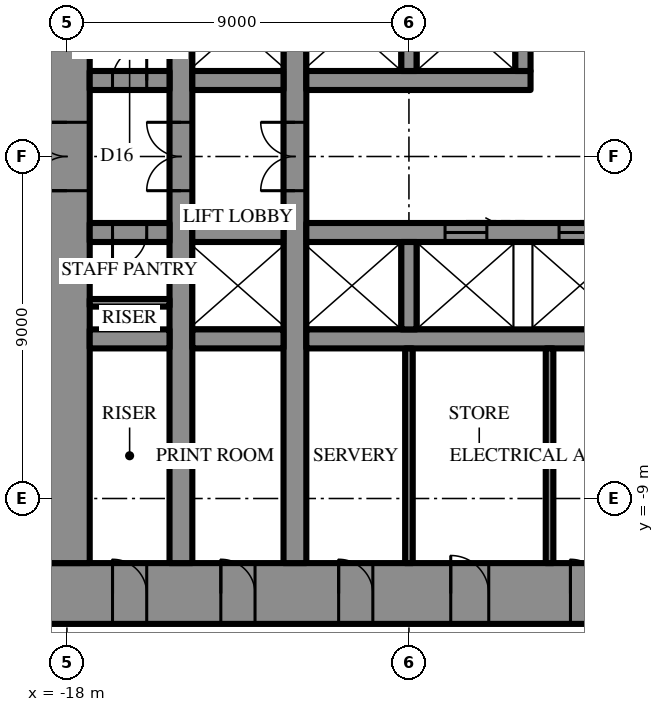
"""IFC4 building model, lengths in metres.
Left out: names, types, materials, properties, quantities, classifications, styles, units other than length and angle.
Written with IfcOpenShell. Run it as: python <this file> out.ifc"""

import sys

from ifc_helpers import new_model, si_unit, direction, frame, frame_2d, origin, place, context, subcontext, project, spatial, rectangle, extrude, element, fill, save


model = new_model("IFC4")
c1 = context("Model", 3, precision=1e-05, world=origin(), true_north=direction((0.0, 1.0)))
c2 = subcontext(c1, "Body", "Model", "MODEL_VIEW")
j1 = project(units=[si_unit("LENGTHUNIT", "METRE"), si_unit("PLANEANGLEUNIT", "RADIAN")], contexts=[c1])
p1 = place(None, origin())
s1 = spatial("IfcSite", under=j1, at=p1, CompositionType="ELEMENT")
p2 = place(p1, origin())
s2 = spatial("IfcBuilding", under=s1, at=p2, CompositionType="ELEMENT")
p3 = place(p2, frame((0.0, 0.0, 136.3)))
s3 = spatial("IfcBuildingStorey", under=s2, at=p3, CompositionType="ELEMENT", Elevation=136.3)
p4 = place(p3, frame((18.6, -11.5, 0.0), z_axis=(0.0, 0.0, 1.0), x_axis=(-1.0, 0.0, 0.0)))
e1 = element("IfcWall", 1, at=p4, inside=s3, PredefinedType="SHEAR", context=c2, shape_type="SweptSolid", body=[
    extrude(rectangle(XDim=37.2, YDim=1.6, at=frame_2d((18.6, 0.0))), origin(), (0.0, 0.0, 1.0), 4.2),
])
p5 = place(p4, frame((19.45, 0.0, 0.0)))
e2 = element("IfcOpeningElement", 2, at=p5, cuts=e1, PredefinedType="OPENING", context=c2, shape_type="SweptSolid", body=[
    extrude(rectangle(XDim=0.9, YDim=2.2, at=frame_2d((0.45, 1.1))), frame((0.0, 0.81, 0.0), z_axis=(0.0, -1.0, 0.0), x_axis=(1.0, 0.0, 0.0)), (0.0, 0.0, 1.0), 1.62),
])
p6 = place(p4, frame((22.45, 0.0, 0.0)))
e3 = element("IfcOpeningElement", 3, at=p6, cuts=e1, PredefinedType="OPENING", context=c2, shape_type="SweptSolid", body=[
    extrude(rectangle(XDim=0.9, YDim=2.2, at=frame_2d((0.45, 1.1))), frame((0.0, 0.81, 0.0), z_axis=(0.0, -1.0, 0.0), x_axis=(1.0, 0.0, 0.0)), (0.0, 0.0, 1.0), 1.62),
])
p7 = place(p4, frame((25.5, 0.0, 0.0)))
e4 = element("IfcOpeningElement", 4, at=p7, cuts=e1, PredefinedType="OPENING", context=c2, shape_type="SweptSolid", body=[
    extrude(rectangle(XDim=1.0, YDim=2.2, at=frame_2d((0.5, 1.1))), frame((0.0, 0.81, 0.0), z_axis=(0.0, -1.0, 0.0), x_axis=(1.0, 0.0, 0.0)), (0.0, 0.0, 1.0), 1.62),
])
p8 = place(p4, frame((1.8, 0.0, 0.0)))
e5 = element("IfcOpeningElement", 5, at=p8, cuts=e1, PredefinedType="OPENING", context=c2, shape_type="SweptSolid", body=[
    extrude(rectangle(XDim=0.9, YDim=2.2, at=frame_2d((0.45, 1.1))), frame((0.0, 0.81, 0.0), z_axis=(0.0, -1.0, 0.0), x_axis=(1.0, 0.0, 0.0)), (0.0, 0.0, 1.0), 1.62),
])
p9 = place(p4, frame((4.65, 0.0, 0.0)))
e6 = element("IfcOpeningElement", 6, at=p9, cuts=e1, PredefinedType="OPENING", context=c2, shape_type="SweptSolid", body=[
    extrude(rectangle(XDim=0.9, YDim=2.2, at=frame_2d((0.45, 1.1))), frame((0.0, 0.81, 0.0), z_axis=(0.0, -1.0, 0.0), x_axis=(1.0, 0.0, 0.0)), (0.0, 0.0, 1.0), 1.62),
])
p10 = place(p4, frame((7.75, 0.0, 0.0)))
e7 = element("IfcOpeningElement", 7, at=p10, cuts=e1, PredefinedType="OPENING", context=c2, shape_type="SweptSolid", body=[
    extrude(rectangle(XDim=0.9, YDim=2.2, at=frame_2d((0.45, 1.1))), frame((0.0, 0.81, 0.0), z_axis=(0.0, -1.0, 0.0), x_axis=(1.0, 0.0, 0.0)), (0.0, 0.0, 1.0), 1.62),
])
p11 = place(p4, frame((28.55, 0.0, 0.0)))
e8 = element("IfcOpeningElement", 8, at=p11, cuts=e1, PredefinedType="OPENING", context=c2, shape_type="SweptSolid", body=[
    extrude(rectangle(XDim=0.9, YDim=2.2, at=frame_2d((0.45, 1.1))), frame((0.0, 0.81, 0.0), z_axis=(0.0, -1.0, 0.0), x_axis=(1.0, 0.0, 0.0)), (0.0, 0.0, 1.0), 1.62),
])
p12 = place(p4, frame((31.65, 0.0, 0.0)))
e9 = element("IfcOpeningElement", 9, at=p12, cuts=e1, PredefinedType="OPENING", context=c2, shape_type="SweptSolid", body=[
    extrude(rectangle(XDim=0.9, YDim=2.2, at=frame_2d((0.45, 1.1))), frame((0.0, 0.81, 0.0), z_axis=(0.0, -1.0, 0.0), x_axis=(1.0, 0.0, 0.0)), (0.0, 0.0, 1.0), 1.62),
])
p13 = place(p4, frame((34.5, 0.0, 0.0)))
e10 = element("IfcOpeningElement", 10, at=p13, cuts=e1, PredefinedType="OPENING", context=c2, shape_type="SweptSolid", body=[
    extrude(rectangle(XDim=0.9, YDim=2.2, at=frame_2d((0.45, 1.1))), frame((0.0, 0.81, 0.0), z_axis=(0.0, -1.0, 0.0), x_axis=(1.0, 0.0, 0.0)), (0.0, 0.0, 1.0), 1.62),
])
p14 = place(p3, frame((-18.0, 10.7, 0.0), z_axis=(0.0, 0.0, 1.0), x_axis=(0.0, -1.0, 0.0)))
e11 = element("IfcWall", 11, at=p14, inside=s3, PredefinedType="SHEAR", context=c2, shape_type="SweptSolid", body=[
    extrude(rectangle(XDim=21.4, YDim=1.2, at=frame_2d((10.7, 0.0))), origin(), (0.0, 0.0, 1.0), 4.2),
])
p15 = place(p14, frame((9.8, 0.0, 0.0)))
e12 = element("IfcOpeningElement", 12, at=p15, cuts=e11, PredefinedType="OPENING", context=c2, shape_type="SweptSolid", body=[
    extrude(rectangle(XDim=1.8, YDim=2.4, at=frame_2d((0.9, 1.2))), frame((0.0, 0.61, 0.0), z_axis=(0.0, -1.0, 0.0), x_axis=(1.0, 0.0, 0.0)), (0.0, 0.0, 1.0), 1.22),
])
p16 = place(p3, frame((-12.0, -10.7, 0.0), z_axis=(0.0, 0.0, 1.0), x_axis=(0.0, 1.0, 0.0)))
e13 = element("IfcWall", 13, at=p16, inside=s3, PredefinedType="SHEAR", context=c2, shape_type="SweptSolid", body=[
    extrude(rectangle(XDim=21.4, YDim=0.6, at=frame_2d((10.7, 0.0))), origin(), (0.0, 0.0, 1.0), 4.2),
])
p17 = place(p16, frame((9.8, 0.0, 0.0)))
e14 = element("IfcOpeningElement", 14, at=p17, cuts=e13, PredefinedType="OPENING", context=c2, shape_type="SweptSolid", body=[
    extrude(rectangle(XDim=1.8, YDim=2.4, at=frame_2d((0.9, 1.2))), frame((0.0, 0.31, 0.0), z_axis=(0.0, -1.0, 0.0), x_axis=(1.0, 0.0, 0.0)), (0.0, 0.0, 1.0), 0.62),
])
p18 = place(p3, frame((-15.0, -10.7, 0.0), z_axis=(0.0, 0.0, 1.0), x_axis=(0.0, 1.0, 0.0)))
e15 = element("IfcWall", 15, at=p18, inside=s3, PredefinedType="SHEAR", context=c2, shape_type="SweptSolid", body=[
    extrude(rectangle(XDim=21.4, YDim=0.6, at=frame_2d((10.7, 0.0))), origin(), (0.0, 0.0, 1.0), 4.2),
])
p19 = place(p18, frame((9.8, 0.0, 0.0)))
e16 = element("IfcOpeningElement", 16, at=p19, cuts=e15, PredefinedType="OPENING", context=c2, shape_type="SweptSolid", body=[
    extrude(rectangle(XDim=1.8, YDim=2.4, at=frame_2d((0.9, 1.2))), frame((0.0, 0.31, 0.0), z_axis=(0.0, -1.0, 0.0), x_axis=(1.0, 0.0, 0.0)), (0.0, 0.0, 1.0), 0.62),
])
p20 = place(p3, frame((-17.4, 2.0, 0.0), z_axis=(0.0, 0.0, 1.0), x_axis=(1.0, 0.0, 0.0)))
e17 = element("IfcWall", 17, at=p20, inside=s3, PredefinedType="SHEAR", context=c2, shape_type="SweptSolid", body=[
    extrude(rectangle(XDim=2.1, YDim=0.5, at=frame_2d((1.05, 0.0))), origin(), (0.0, 0.0, 1.0), 4.2),
])
p21 = place(p20, frame((0.6, 0.0, 0.0)))
e18 = element("IfcOpeningElement", 18, at=p21, cuts=e17, PredefinedType="OPENING", context=c2, shape_type="SweptSolid", body=[
    extrude(rectangle(XDim=0.9, YDim=2.2, at=frame_2d((0.45, 1.1))), frame((0.0, 0.26, 0.0), z_axis=(0.0, -1.0, 0.0), x_axis=(1.0, 0.0, 0.0)), (0.0, 0.0, 1.0), 0.52),
])
p22 = place(p3, frame((-14.7, 2.0, 0.0), z_axis=(0.0, 0.0, 1.0), x_axis=(1.0, 0.0, 0.0)))
e19 = element("IfcWall", 19, at=p22, inside=s3, PredefinedType="SHEAR", context=c2, shape_type="SweptSolid", body=[
    extrude(rectangle(XDim=2.4, YDim=0.5, at=frame_2d((1.2, 0.0))), origin(), (0.0, 0.0, 1.0), 4.2),
])
p23 = place(p3, frame((-11.7, 2.0, 0.0), z_axis=(0.0, 0.0, 1.0), x_axis=(1.0, 0.0, 0.0)))
e20 = element("IfcWall", 20, at=p23, inside=s3, PredefinedType="SHEAR", context=c2, shape_type="SweptSolid", body=[
    extrude(rectangle(XDim=5.9, YDim=0.5, at=frame_2d((2.95, 0.0))), origin(), (0.0, 0.0, 1.0), 4.2),
])
for number, where, z_axis, x_axis in (
    (21, (-9.0, 2.25, 0.0), (0.0, 0.0, 1.0), (0.0, 1.0, 0.0)),
    (22, (-6.0, 2.25, 0.0), (0.0, 0.0, 1.0), (0.0, 1.0, 0.0)),
):
    element("IfcWall", number, at=place(p3, frame(where, z_axis=z_axis, x_axis=x_axis)), inside=s3, PredefinedType="SHEAR", context=c2, shape_type="SweptSolid", body=[
        extrude(rectangle(XDim=2.3, YDim=0.4, at=frame_2d((1.15, 0.0))), origin(), (0.0, 0.0, 1.0), 4.2),
    ])
p24 = place(p3, frame((3.2, -2.0, 0.0), z_axis=(0.0, 0.0, 1.0), x_axis=(-1.0, 0.0, 0.0)))
e23 = element("IfcWall", 23, at=p24, inside=s3, PredefinedType="SHEAR", context=c2, shape_type="SweptSolid", body=[
    extrude(rectangle(XDim=14.9, YDim=0.5, at=frame_2d((7.45, 0.0))), origin(), (0.0, 0.0, 1.0), 4.2),
])
p25 = place(p24, frame((1.15, 0.0, 0.0)))
e24 = element("IfcOpeningElement", 24, at=p25, cuts=e23, PredefinedType="OPENING", context=c2, shape_type="SweptSolid", body=[
    extrude(rectangle(XDim=1.1, YDim=2.2, at=frame_2d((0.55, 1.1))), frame((0.0, 0.26, 0.0), z_axis=(0.0, -1.0, 0.0), x_axis=(1.0, 0.0, 0.0)), (0.0, 0.0, 1.0), 0.52),
])
p26 = place(p24, frame((4.15, 0.0, 0.0)))
e25 = element("IfcOpeningElement", 25, at=p26, cuts=e23, PredefinedType="OPENING", context=c2, shape_type="SweptSolid", body=[
    extrude(rectangle(XDim=1.1, YDim=2.2, at=frame_2d((0.55, 1.1))), frame((0.0, 0.26, 0.0), z_axis=(0.0, -1.0, 0.0), x_axis=(1.0, 0.0, 0.0)), (0.0, 0.0, 1.0), 0.52),
])
p27 = place(p24, frame((7.15, 0.0, 0.0)))
e26 = element("IfcOpeningElement", 26, at=p27, cuts=e23, PredefinedType="OPENING", context=c2, shape_type="SweptSolid", body=[
    extrude(rectangle(XDim=1.1, YDim=2.2, at=frame_2d((0.55, 1.1))), frame((0.0, 0.26, 0.0), z_axis=(0.0, -1.0, 0.0), x_axis=(1.0, 0.0, 0.0)), (0.0, 0.0, 1.0), 0.52),
])
p28 = place(p24, frame((10.15, 0.0, 0.0)))
e27 = element("IfcOpeningElement", 27, at=p28, cuts=e23, PredefinedType="OPENING", context=c2, shape_type="SweptSolid", body=[
    extrude(rectangle(XDim=1.1, YDim=2.2, at=frame_2d((0.55, 1.1))), frame((0.0, 0.26, 0.0), z_axis=(0.0, -1.0, 0.0), x_axis=(1.0, 0.0, 0.0)), (0.0, 0.0, 1.0), 0.52),
])
p29 = place(p3, frame((-12.3, -2.0, 0.0), z_axis=(0.0, 0.0, 1.0), x_axis=(-1.0, 0.0, 0.0)))
e28 = element("IfcWall", 28, at=p29, inside=s3, PredefinedType="SHEAR", context=c2, shape_type="SweptSolid", body=[
    extrude(rectangle(XDim=2.4, YDim=0.5, at=frame_2d((1.2, 0.0))), origin(), (0.0, 0.0, 1.0), 4.2),
])
p30 = place(p3, frame((-15.3, -2.0, 0.0), z_axis=(0.0, 0.0, 1.0), x_axis=(-1.0, 0.0, 0.0)))
e29 = element("IfcWall", 29, at=p30, inside=s3, PredefinedType="SHEAR", context=c2, shape_type="SweptSolid", body=[
    extrude(rectangle(XDim=2.1, YDim=0.5, at=frame_2d((1.05, 0.0))), origin(), (0.0, 0.0, 1.0), 4.2),
])
p31 = place(p30, frame((0.6, 0.0, 0.0)))
e30 = element("IfcOpeningElement", 30, at=p31, cuts=e29, PredefinedType="OPENING", context=c2, shape_type="SweptSolid", body=[
    extrude(rectangle(XDim=0.9, YDim=2.2, at=frame_2d((0.45, 1.1))), frame((0.0, 0.26, 0.0), z_axis=(0.0, -1.0, 0.0), x_axis=(1.0, 0.0, 0.0)), (0.0, 0.0, 1.0), 0.52),
])
p32 = place(p3, frame((11.7, -4.8, 0.0), z_axis=(0.0, 0.0, 1.0), x_axis=(-1.0, 0.0, 0.0)))
e31 = element("IfcWall", 31, at=p32, inside=s3, PredefinedType="SHEAR", context=c2, shape_type="SweptSolid", body=[
    extrude(rectangle(XDim=23.4, YDim=0.5, at=frame_2d((11.7, 0.0))), origin(), (0.0, 0.0, 1.0), 4.2),
])
p33 = place(p32, frame((6.6, 0.0, 0.0)))
e32 = element("IfcOpeningElement", 32, at=p33, cuts=e31, PredefinedType="OPENING", context=c2, shape_type="SweptSolid", body=[
    extrude(rectangle(XDim=1.2, YDim=2.2, at=frame_2d((0.6, 1.1))), frame((0.0, 0.26, 0.0), z_axis=(0.0, -1.0, 0.0), x_axis=(1.0, 0.0, 0.0)), (0.0, 0.0, 1.0), 0.52),
])
p34 = place(p32, frame((3.6, 0.0, 0.0)))
e33 = element("IfcOpeningElement", 33, at=p34, cuts=e31, PredefinedType="OPENING", context=c2, shape_type="SweptSolid", body=[
    extrude(rectangle(XDim=1.2, YDim=2.2, at=frame_2d((0.6, 1.1))), frame((0.0, 0.26, 0.0), z_axis=(0.0, -1.0, 0.0), x_axis=(1.0, 0.0, 0.0)), (0.0, 0.0, 1.0), 0.52),
])
p35 = place(p3, frame((-12.3, -4.8, 0.0), z_axis=(0.0, 0.0, 1.0), x_axis=(-1.0, 0.0, 0.0)))
e34 = element("IfcWall", 34, at=p35, inside=s3, PredefinedType="SHEAR", context=c2, shape_type="SweptSolid", body=[
    extrude(rectangle(XDim=2.4, YDim=0.5, at=frame_2d((1.2, 0.0))), origin(), (0.0, 0.0, 1.0), 4.2),
])
p36 = place(p3, frame((-15.3, -4.8, 0.0), z_axis=(0.0, 0.0, 1.0), x_axis=(-1.0, 0.0, 0.0)))
e35 = element("IfcWall", 35, at=p36, inside=s3, PredefinedType="SHEAR", context=c2, shape_type="SweptSolid", body=[
    extrude(rectangle(XDim=2.1, YDim=0.5, at=frame_2d((1.05, 0.0))), origin(), (0.0, 0.0, 1.0), 4.2),
])
p37 = place(p3, frame((-9.0, -2.25, 0.0), z_axis=(0.0, 0.0, 1.0), x_axis=(0.0, -1.0, 0.0)))
e36 = element("IfcWall", 36, at=p37, inside=s3, PredefinedType="SHEAR", context=c2, shape_type="SweptSolid", body=[
    extrude(rectangle(XDim=2.3, YDim=0.4, at=frame_2d((1.15, 0.0))), origin(), (0.0, 0.0, 1.0), 4.2),
])
for number, where, z_axis, x_axis in (
    (37, (-9.0, -5.05, 0.0), (0.0, 0.0, 1.0), (0.0, -1.0, 0.0)),
    (38, (-5.3, -5.05, 0.0), (0.0, 0.0, 1.0), (0.0, -1.0, 0.0)),
):
    element("IfcWall", number, at=place(p3, frame(where, z_axis=z_axis, x_axis=x_axis)), inside=s3, PredefinedType="PARTITIONING", context=c2, shape_type="SweptSolid", body=[
        extrude(rectangle(XDim=5.65, YDim=0.2, at=frame_2d((2.825, 0.0))), origin(), (0.0, 0.0, 1.0), 4.0),
    ])
p38 = place(p3, frame((-15.3, -3.85, 0.0), z_axis=(0.0, 0.0, 1.0), x_axis=(-1.0, 0.0, 0.0)))
e39 = element("IfcWall", 39, at=p38, inside=s3, PredefinedType="PARTITIONING", context=c2, shape_type="SweptSolid", body=[
    extrude(rectangle(XDim=2.1, YDim=0.2, at=frame_2d((1.05, 0.0))), origin(), (0.0, 0.0, 1.0), 4.0),
])
p39 = place(p15, frame((1.8, 0.0, 0.0), z_axis=(0.0, 0.0, 1.0), x_axis=(-1.0, 0.0, 0.0)))
e40 = element("IfcDoor", 40, at=p39, inside=s3, OperationType="DOUBLE_DOOR_SINGLE_SWING", PredefinedType="DOOR", context=c2, shape_type="SweptSolid", body=[
    extrude(rectangle(XDim=1.8, YDim=2.4, at=frame_2d((0.9, 1.2))), frame((0.0, 0.025, 0.0), z_axis=(0.0, -1.0, 0.0), x_axis=(1.0, 0.0, 0.0)), (0.0, 0.0, 1.0), 0.05),
])
fill(e12, e40)
p40 = place(p6, frame((0.9, 0.0, 0.0), z_axis=(0.0, 0.0, 1.0), x_axis=(-1.0, 0.0, 0.0)))
e41 = element("IfcDoor", 41, at=p40, inside=s3, OperationType="SINGLE_SWING_RIGHT", PredefinedType="DOOR", context=c2, shape_type="SweptSolid", body=[
    extrude(rectangle(XDim=0.9, YDim=2.2, at=frame_2d((0.45, 1.1))), frame((0.0, 0.025, 0.0), z_axis=(0.0, -1.0, 0.0), x_axis=(1.0, 0.0, 0.0)), (0.0, 0.0, 1.0), 0.05),
])
fill(e3, e41)
p41 = place(p7, frame((1.0, 0.0, 0.0), z_axis=(0.0, 0.0, 1.0), x_axis=(-1.0, 0.0, 0.0)))
e42 = element("IfcDoor", 42, at=p41, inside=s3, OperationType="SINGLE_SWING_RIGHT", PredefinedType="DOOR", context=c2, shape_type="SweptSolid", body=[
    extrude(rectangle(XDim=1.0, YDim=2.2, at=frame_2d((0.5, 1.1))), frame((0.0, 0.025, 0.0), z_axis=(0.0, -1.0, 0.0), x_axis=(1.0, 0.0, 0.0)), (0.0, 0.0, 1.0), 0.05),
])
fill(e4, e42)
p42 = place(p11, frame((0.9, 0.0, 0.0), z_axis=(0.0, 0.0, 1.0), x_axis=(-1.0, 0.0, 0.0)))
e43 = element("IfcDoor", 43, at=p42, inside=s3, OperationType="SINGLE_SWING_RIGHT", PredefinedType="DOOR", context=c2, shape_type="SweptSolid", body=[
    extrude(rectangle(XDim=0.9, YDim=2.2, at=frame_2d((0.45, 1.1))), frame((0.0, 0.025, 0.0), z_axis=(0.0, -1.0, 0.0), x_axis=(1.0, 0.0, 0.0)), (0.0, 0.0, 1.0), 0.05),
])
fill(e8, e43)
p43 = place(p12, frame((0.9, 0.0, 0.0), z_axis=(0.0, 0.0, 1.0), x_axis=(-1.0, 0.0, 0.0)))
e44 = element("IfcDoor", 44, at=p43, inside=s3, OperationType="SINGLE_SWING_RIGHT", PredefinedType="DOOR", context=c2, shape_type="SweptSolid", body=[
    extrude(rectangle(XDim=0.9, YDim=2.2, at=frame_2d((0.45, 1.1))), frame((0.0, 0.025, 0.0), z_axis=(0.0, -1.0, 0.0), x_axis=(1.0, 0.0, 0.0)), (0.0, 0.0, 1.0), 0.05),
])
fill(e9, e44)
p44 = place(p13, frame((0.9, 0.0, 0.0), z_axis=(0.0, 0.0, 1.0), x_axis=(-1.0, 0.0, 0.0)))
e45 = element("IfcDoor", 45, at=p44, inside=s3, OperationType="SINGLE_SWING_RIGHT", PredefinedType="DOOR", context=c2, shape_type="SweptSolid", body=[
    extrude(rectangle(XDim=0.9, YDim=2.2, at=frame_2d((0.45, 1.1))), frame((0.0, 0.025, 0.0), z_axis=(0.0, -1.0, 0.0), x_axis=(1.0, 0.0, 0.0)), (0.0, 0.0, 1.0), 0.05),
])
fill(e10, e45)
p45 = place(p21, origin())
e46 = element("IfcDoor", 46, at=p45, inside=s3, OperationType="SINGLE_SWING_LEFT", PredefinedType="DOOR", context=c2, shape_type="SweptSolid", body=[
    extrude(rectangle(XDim=0.9, YDim=2.2, at=frame_2d((0.45, 1.1))), frame((0.0, 0.025, 0.0), z_axis=(0.0, -1.0, 0.0), x_axis=(1.0, 0.0, 0.0)), (0.0, 0.0, 1.0), 0.05),
])
fill(e18, e46)
p46 = place(p31, origin())
e47 = element("IfcDoor", 47, at=p46, inside=s3, OperationType="SINGLE_SWING_LEFT", PredefinedType="DOOR", context=c2, shape_type="SweptSolid", body=[
    extrude(rectangle(XDim=0.9, YDim=2.2, at=frame_2d((0.45, 1.1))), frame((0.0, 0.025, 0.0), z_axis=(0.0, -1.0, 0.0), x_axis=(1.0, 0.0, 0.0)), (0.0, 0.0, 1.0), 0.05),
])
fill(e30, e47)
p47 = place(p17, origin())
e48 = element("IfcDoor", 48, at=p47, inside=s3, OperationType="DOUBLE_DOOR_SINGLE_SWING", PredefinedType="DOOR", context=c2, shape_type="SweptSolid", body=[
    extrude(rectangle(XDim=1.8, YDim=2.4, at=frame_2d((0.9, 1.2))), frame((0.0, 0.025, 0.0), z_axis=(0.0, -1.0, 0.0), x_axis=(1.0, 0.0, 0.0)), (0.0, 0.0, 1.0), 0.05),
])
fill(e14, e48)
p48 = place(p19, origin())
e49 = element("IfcDoor", 49, at=p48, inside=s3, OperationType="DOUBLE_DOOR_SINGLE_SWING", PredefinedType="DOOR", context=c2, shape_type="SweptSolid", body=[
    extrude(rectangle(XDim=1.8, YDim=2.4, at=frame_2d((0.9, 1.2))), frame((0.0, 0.025, 0.0), z_axis=(0.0, -1.0, 0.0), x_axis=(1.0, 0.0, 0.0)), (0.0, 0.0, 1.0), 0.05),
])
fill(e16, e49)
p49 = place(p27, frame((1.1, 0.0, 0.0), z_axis=(0.0, 0.0, 1.0), x_axis=(-1.0, 0.0, 0.0)))
e50 = element("IfcDoor", 50, at=p49, inside=s3, OperationType="SLIDING_TO_LEFT", PredefinedType="DOOR", context=c2, shape_type="SweptSolid", body=[
    extrude(rectangle(XDim=1.1, YDim=2.2, at=frame_2d((0.55, 1.1))), frame((0.0, 0.025, 0.0), z_axis=(0.0, -1.0, 0.0), x_axis=(1.0, 0.0, 0.0)), (0.0, 0.0, 1.0), 0.05),
])
fill(e26, e50)
p50 = place(p28, frame((1.1, 0.0, 0.0), z_axis=(0.0, 0.0, 1.0), x_axis=(-1.0, 0.0, 0.0)))
e51 = element("IfcDoor", 51, at=p50, inside=s3, OperationType="SLIDING_TO_LEFT", PredefinedType="DOOR", context=c2, shape_type="SweptSolid", body=[
    extrude(rectangle(XDim=1.1, YDim=2.2, at=frame_2d((0.55, 1.1))), frame((0.0, 0.025, 0.0), z_axis=(0.0, -1.0, 0.0), x_axis=(1.0, 0.0, 0.0)), (0.0, 0.0, 1.0), 0.05),
])
fill(e27, e51)
save(model, sys.argv[1])
